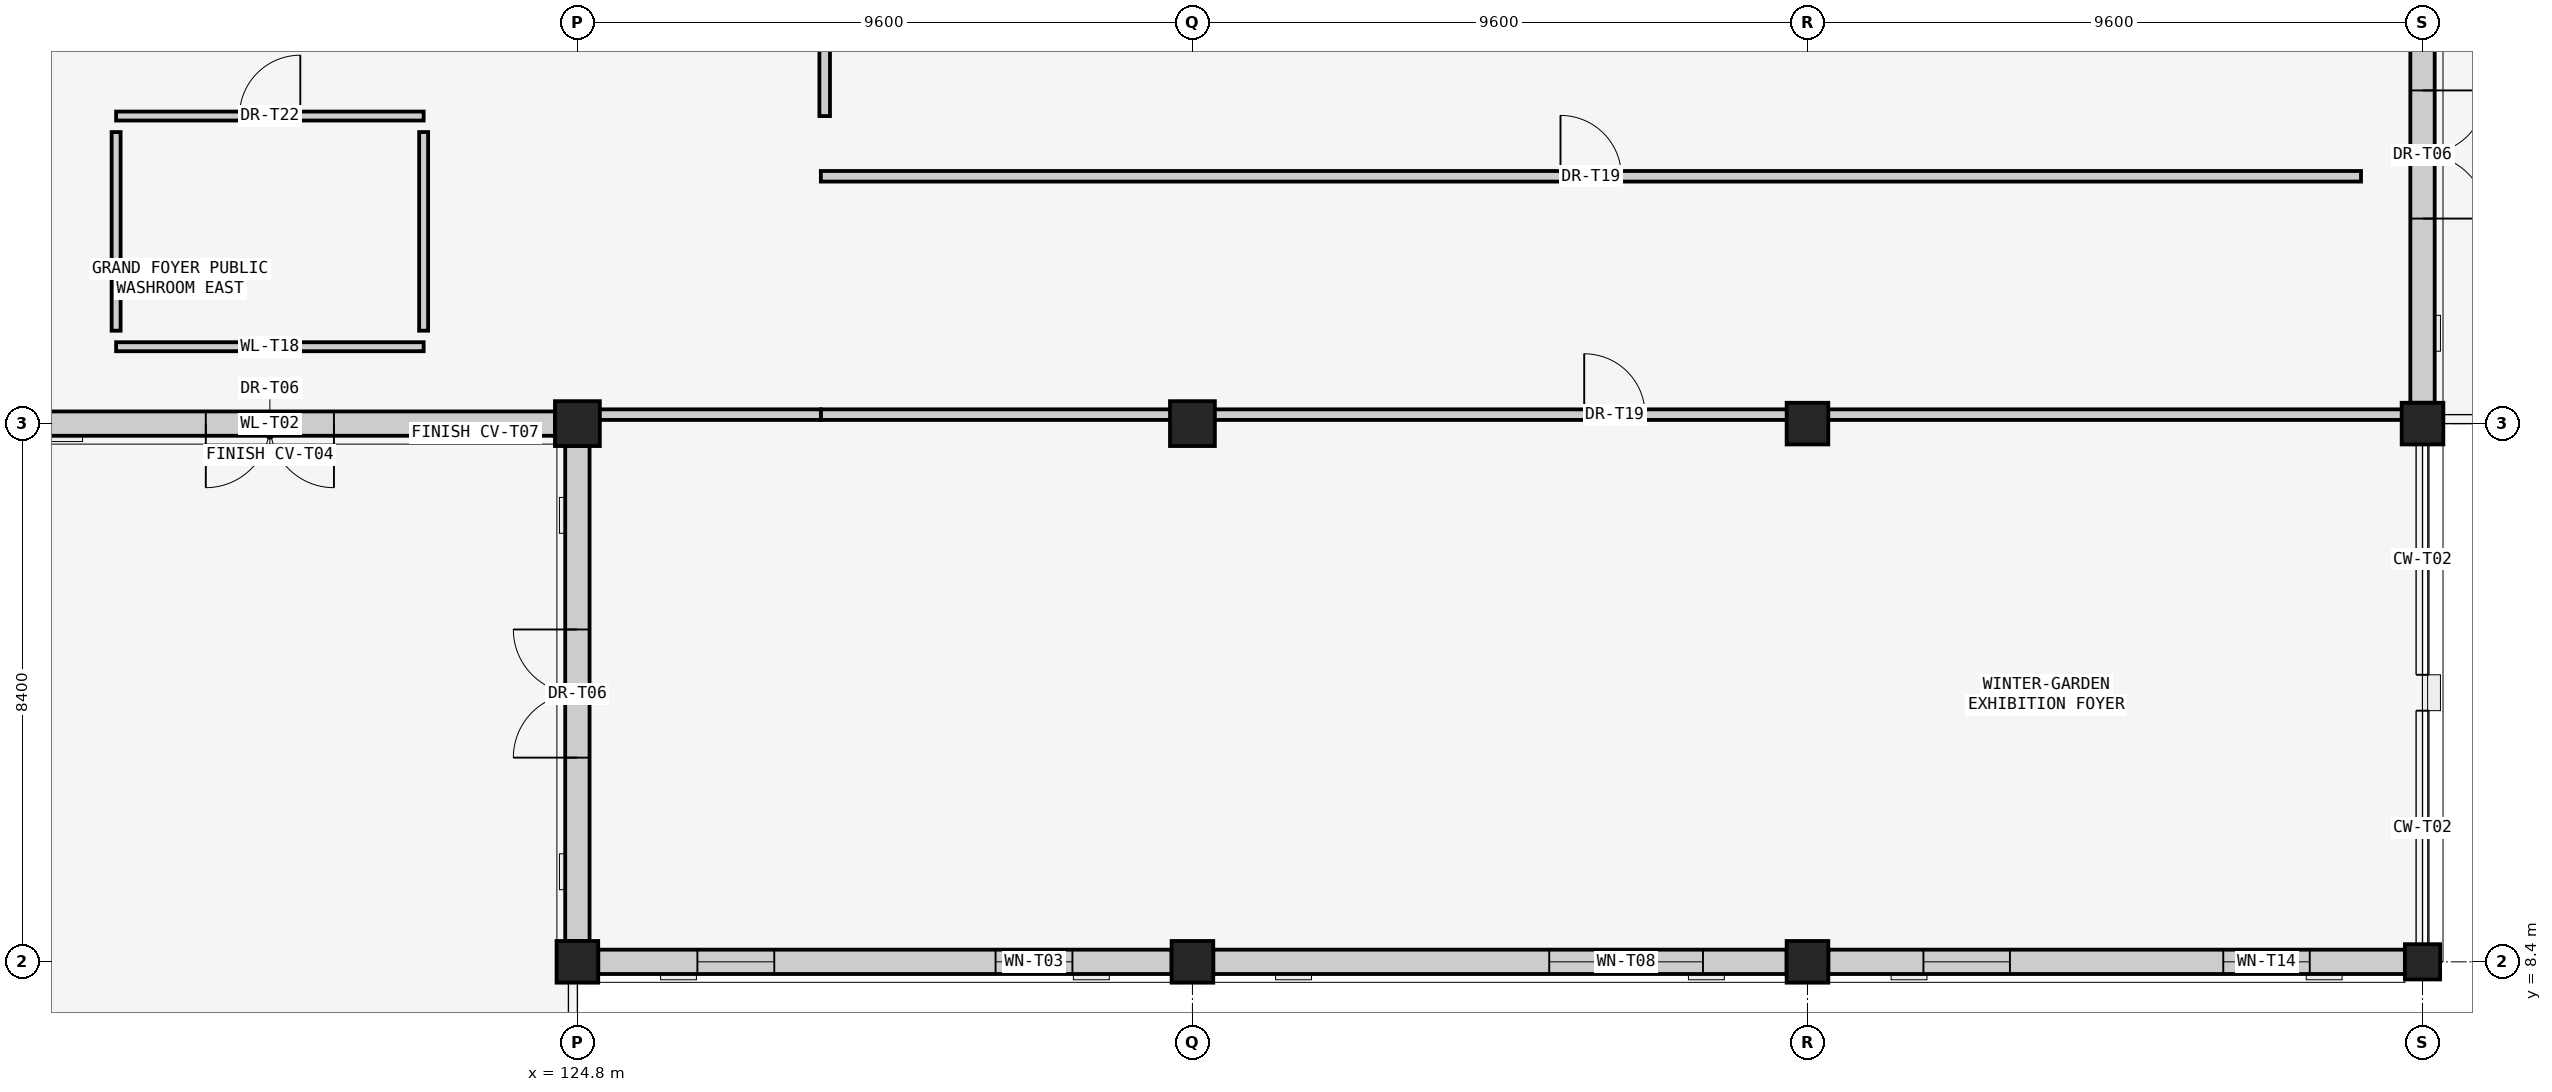
"""IFC4 building model, lengths in metres.
Left out: names, types, materials, properties, quantities, classifications, styles, units other than length and angle.
Written with IfcOpenShell. Run it as: python <this file> out.ifc"""

import sys

from ifc_helpers import new_model, si_unit, direction, frame, frame_2d, origin, origin_2d, place, context, subcontext, project, spatial, rectangle, extrude, element, fill, save


model = new_model("IFC4")
c1 = context("Model", 3, precision=1e-05, world=origin(), true_north=direction((0.0, 1.0)))
c2 = subcontext(c1, "Body", "Model", "MODEL_VIEW")
j1 = project(units=[si_unit("LENGTHUNIT", "METRE"), si_unit("PLANEANGLEUNIT", "RADIAN")], contexts=[c1])
p1 = place(None, origin())
s1 = spatial("IfcSite", under=j1, at=p1, CompositionType="ELEMENT")
p2 = place(p1, origin())
s2 = spatial("IfcBuilding", under=s1, at=p2, CompositionType="ELEMENT")
p3 = place(p2, origin())
s3 = spatial("IfcBuildingStorey", under=s2, at=p3, CompositionType="ELEMENT", Elevation=0.0)
p4 = place(p3, frame((124.8, 8.4, 0.0), z_axis=(0.0, 0.0, 1.0), x_axis=(1.0, 0.0, 0.0)))
e1 = element("IfcColumn", 1, at=p4, inside=s3, PredefinedType="COLUMN", context=c2, shape_type="SweptSolid", body=[
    extrude(rectangle(XDim=0.65, YDim=0.65, at=origin_2d()), origin(), (0.0, 0.0, 1.0), 5.12),
])
p5 = place(p3, frame((124.8, 16.8, 0.0), z_axis=(0.0, 0.0, 1.0), x_axis=(1.0, 0.0, 0.0)))
e2 = element("IfcColumn", 2, at=p5, inside=s3, PredefinedType="COLUMN", context=c2, shape_type="SweptSolid", body=[
    extrude(rectangle(XDim=0.7, YDim=0.7, at=origin_2d()), origin(), (0.0, 0.0, 1.0), 5.12),
])
p6 = place(p3, frame((134.4, 8.4, 0.0), z_axis=(0.0, 0.0, 1.0), x_axis=(1.0, 0.0, 0.0)))
e3 = element("IfcColumn", 3, at=p6, inside=s3, PredefinedType="COLUMN", context=c2, shape_type="SweptSolid", body=[
    extrude(rectangle(XDim=0.65, YDim=0.65, at=origin_2d()), origin(), (0.0, 0.0, 1.0), 5.12),
])
p7 = place(p3, frame((134.4, 16.8, 0.0), z_axis=(0.0, 0.0, 1.0), x_axis=(1.0, 0.0, 0.0)))
e4 = element("IfcColumn", 4, at=p7, inside=s3, PredefinedType="COLUMN", context=c2, shape_type="SweptSolid", body=[
    extrude(rectangle(XDim=0.7, YDim=0.7, at=origin_2d()), origin(), (0.0, 0.0, 1.0), 5.12),
])
p8 = place(p3, frame((144.0, 8.4, 0.0), z_axis=(0.0, 0.0, 1.0), x_axis=(1.0, 0.0, 0.0)))
e5 = element("IfcColumn", 5, at=p8, inside=s3, PredefinedType="COLUMN", context=c2, shape_type="SweptSolid", body=[
    extrude(rectangle(XDim=0.65, YDim=0.65, at=origin_2d()), origin(), (0.0, 0.0, 1.0), 5.12),
])
p9 = place(p3, frame((144.0, 16.8, 0.0), z_axis=(0.0, 0.0, 1.0), x_axis=(1.0, 0.0, 0.0)))
e6 = element("IfcColumn", 6, at=p9, inside=s3, PredefinedType="PILASTER", context=c2, shape_type="SweptSolid", body=[
    extrude(rectangle(XDim=0.65, YDim=0.65, at=origin_2d()), origin(), (0.0, 0.0, 1.0), 5.12),
])
p10 = place(p3, frame((153.6, 8.4, 0.0), z_axis=(0.0, 0.0, 1.0), x_axis=(1.0, 0.0, 0.0)))
e7 = element("IfcColumn", 7, at=p10, inside=s3, PredefinedType="COLUMN", context=c2, shape_type="SweptSolid", body=[
    extrude(rectangle(XDim=0.55, YDim=0.55, at=origin_2d()), origin(), (0.0, 0.0, 1.0), 5.17),
])
p11 = place(p3, frame((153.6, 16.8, 0.0), z_axis=(0.0, 0.0, 1.0), x_axis=(1.0, 0.0, 0.0)))
e8 = element("IfcColumn", 8, at=p11, inside=s3, PredefinedType="COLUMN", context=c2, shape_type="SweptSolid", body=[
    extrude(rectangle(XDim=0.65, YDim=0.65, at=origin_2d()), origin(), (0.0, 0.0, 1.0), 5.12),
])
p12 = place(p3, frame((124.45, 16.8, 0.0), z_axis=(0.0, 0.0, 1.0), x_axis=(-1.0, 0.0, 0.0)))
e9 = element("IfcWall", 9, at=p12, inside=s3, PredefinedType="SOLIDWALL", context=c2, shape_type="SweptSolid", body=[
    extrude(rectangle(XDim=8.9, YDim=0.38, at=frame_2d((4.45, 0.0))), origin(), (0.0, 0.0, 1.0), 4.5),
])
p13 = place(p12, frame((3.45, 0.0, 0.0)))
e10 = element("IfcOpeningElement", 10, at=p13, cuts=e9, PredefinedType="OPENING", context=c2, shape_type="SweptSolid", body=[
    extrude(rectangle(XDim=2.0, YDim=2.25, at=frame_2d((1.0, 1.125))), frame((0.0, 0.2, 0.0), z_axis=(0.0, -1.0, 0.0), x_axis=(1.0, 0.0, 0.0)), (0.0, 0.0, 1.0), 0.4),
])
p14 = place(p3, frame((134.075, 8.4, 0.0), z_axis=(0.0, 0.0, 1.0), x_axis=(-1.0, 0.0, 0.0)))
e11 = element("IfcWall", 11, at=p14, inside=s3, PredefinedType="SOLIDWALL", context=c2, shape_type="SweptSolid", body=[
    extrude(rectangle(XDim=8.95, YDim=0.38, at=frame_2d((4.475, 0.0))), origin(), (0.0, 0.0, 1.0), 4.5),
])
p15 = place(p14, frame((1.548, 0.0, 0.95)))
e12 = element("IfcOpeningElement", 12, at=p15, cuts=e11, PredefinedType="OPENING", context=c2, shape_type="SweptSolid", body=[
    extrude(rectangle(XDim=1.2, YDim=2.2, at=frame_2d((0.6, 1.1))), frame((0.0, 0.2, 0.0), z_axis=(0.0, -1.0, 0.0), x_axis=(1.0, 0.0, 0.0)), (0.0, 0.0, 1.0), 0.4),
])
p16 = place(p14, frame((6.202, 0.0, 0.95)))
e13 = element("IfcOpeningElement", 13, at=p16, cuts=e11, PredefinedType="OPENING", context=c2, shape_type="SweptSolid", body=[
    extrude(rectangle(XDim=1.2, YDim=2.2, at=frame_2d((0.6, 1.1))), frame((0.0, 0.2, 0.0), z_axis=(0.0, -1.0, 0.0), x_axis=(1.0, 0.0, 0.0)), (0.0, 0.0, 1.0), 0.4),
])
p17 = place(p3, frame((124.8, 8.725, 0.0), z_axis=(0.0, 0.0, 1.0), x_axis=(0.0, 1.0, 0.0)))
e14 = element("IfcWall", 14, at=p17, inside=s3, PredefinedType="SOLIDWALL", context=c2, shape_type="SweptSolid", body=[
    extrude(rectangle(XDim=7.725, YDim=0.38, at=frame_2d((3.862, 0.0))), origin(), (0.0, 0.0, 1.0), 4.5),
])
p18 = place(p17, frame((2.862, 0.0, 0.0)))
e15 = element("IfcOpeningElement", 15, at=p18, cuts=e14, PredefinedType="OPENING", context=c2, shape_type="SweptSolid", body=[
    extrude(rectangle(XDim=2.0, YDim=2.25, at=frame_2d((1.0, 1.125))), frame((0.0, 0.2, 0.0), z_axis=(0.0, -1.0, 0.0), x_axis=(1.0, 0.0, 0.0)), (0.0, 0.0, 1.0), 0.4),
])
p19 = place(p3, frame((143.675, 8.4, 0.0), z_axis=(0.0, 0.0, 1.0), x_axis=(-1.0, 0.0, 0.0)))
e16 = element("IfcWall", 16, at=p19, inside=s3, PredefinedType="SOLIDWALL", context=c2, shape_type="SweptSolid", body=[
    extrude(rectangle(XDim=8.95, YDim=0.38, at=frame_2d((4.475, 0.0))), origin(), (0.0, 0.0, 1.0), 4.5),
])
p20 = place(p19, frame((1.306, 0.0, 0.95)))
e17 = element("IfcOpeningElement", 17, at=p20, cuts=e16, PredefinedType="OPENING", context=c2, shape_type="SweptSolid", body=[
    extrude(rectangle(XDim=2.4, YDim=2.2, at=frame_2d((1.2, 1.1))), frame((0.0, 0.2, 0.0), z_axis=(0.0, -1.0, 0.0), x_axis=(1.0, 0.0, 0.0)), (0.0, 0.0, 1.0), 0.4),
])
p21 = place(p3, frame((153.325, 8.4, 0.0), z_axis=(0.0, 0.0, 1.0), x_axis=(-1.0, 0.0, 0.0)))
e18 = element("IfcWall", 18, at=p21, inside=s3, PredefinedType="SOLIDWALL", context=c2, shape_type="SweptSolid", body=[
    extrude(rectangle(XDim=9.0, YDim=0.38, at=frame_2d((4.5, 0.0))), origin(), (0.0, 0.0, 1.0), 4.5),
])
p22 = place(p21, frame((1.485, 0.0, 0.85)))
e19 = element("IfcOpeningElement", 19, at=p22, cuts=e18, PredefinedType="OPENING", context=c2, shape_type="SweptSolid", body=[
    extrude(rectangle(XDim=1.35, YDim=2.6, at=frame_2d((0.675, 1.3))), frame((0.0, 0.2, 0.0), z_axis=(0.0, -1.0, 0.0), x_axis=(1.0, 0.0, 0.0)), (0.0, 0.0, 1.0), 0.4),
])
p23 = place(p21, frame((6.165, 0.0, 0.85)))
e20 = element("IfcOpeningElement", 20, at=p23, cuts=e18, PredefinedType="OPENING", context=c2, shape_type="SweptSolid", body=[
    extrude(rectangle(XDim=1.35, YDim=2.6, at=frame_2d((0.675, 1.3))), frame((0.0, 0.2, 0.0), z_axis=(0.0, -1.0, 0.0), x_axis=(1.0, 0.0, 0.0)), (0.0, 0.0, 1.0), 0.4),
])
p24 = place(p3, frame((153.6, 24.875, 0.0), z_axis=(0.0, 0.0, 1.0), x_axis=(0.0, -1.0, 0.0)))
e21 = element("IfcWall", 21, at=p24, inside=s3, PredefinedType="SOLIDWALL", context=c2, shape_type="SweptSolid", body=[
    extrude(rectangle(XDim=7.75, YDim=0.38, at=frame_2d((3.875, 0.0))), origin(), (0.0, 0.0, 1.0), 4.4),
])
p25 = place(p24, frame((2.875, 0.0, 0.0)))
e22 = element("IfcOpeningElement", 22, at=p25, cuts=e21, PredefinedType="OPENING", context=c2, shape_type="SweptSolid", body=[
    extrude(rectangle(XDim=2.0, YDim=2.25, at=frame_2d((1.0, 1.125))), frame((0.0, 0.2, 0.0), z_axis=(0.0, -1.0, 0.0), x_axis=(1.0, 0.0, 0.0)), (0.0, 0.0, 1.0), 0.4),
])
p26 = place(p3, frame((117.6, 18.0, 0.0), z_axis=(0.0, 0.0, 1.0), x_axis=(1.0, 0.0, 0.0)))
e23 = element("IfcWall", 23, at=p26, inside=s3, PredefinedType="PARTITIONING", context=c2, shape_type="SweptSolid", body=[
    extrude(rectangle(XDim=4.8, YDim=0.14, at=frame_2d((2.4, 0.0))), origin(), (0.0, 0.0, 1.0), 4.92),
])
p27 = place(p3, frame((117.6, 21.6, 0.0), z_axis=(0.0, 0.0, 1.0), x_axis=(1.0, 0.0, 0.0)))
e24 = element("IfcWall", 24, at=p27, inside=s3, PredefinedType="PARTITIONING", context=c2, shape_type="SweptSolid", body=[
    extrude(rectangle(XDim=4.8, YDim=0.14, at=frame_2d((2.4, 0.0))), origin(), (0.0, 0.0, 1.0), 4.92),
])
p28 = place(p27, frame((1.925, 0.0, 0.0)))
e25 = element("IfcOpeningElement", 25, at=p28, cuts=e24, PredefinedType="OPENING", context=c2, shape_type="SweptSolid", body=[
    extrude(rectangle(XDim=0.95, YDim=2.15, at=frame_2d((0.475, 1.075))), frame((0.0, 0.08, 0.0), z_axis=(0.0, -1.0, 0.0), x_axis=(1.0, 0.0, 0.0)), (0.0, 0.0, 1.0), 0.16),
])
for number, where, z_axis, x_axis in (
    (26, (117.6, 18.25, 0.0), (0.0, 0.0, 1.0), (0.0, 1.0, 0.0)),
    (27, (122.4, 18.25, 0.0), (0.0, 0.0, 1.0), (0.0, 1.0, 0.0)),
):
    element("IfcWall", number, at=place(p3, frame(where, z_axis=z_axis, x_axis=x_axis)), inside=s3, PredefinedType="PARTITIONING", context=c2, shape_type="SweptSolid", body=[
        extrude(rectangle(XDim=3.1, YDim=0.14, at=frame_2d((1.55, 0.0))), origin(), (0.0, 0.0, 1.0), 4.92),
    ])
p29 = place(p3, frame((128.66, 21.6, 0.0), z_axis=(0.0, 0.0, 1.0), x_axis=(0.0, 1.0, 0.0)))
e28 = element("IfcWall", 28, at=p29, inside=s3, PredefinedType="PARTITIONING", context=c2, shape_type="SweptSolid", body=[
    extrude(rectangle(XDim=3.6, YDim=0.165, at=frame_2d((1.8, 0.0))), origin(), (0.0, 0.0, 1.0), 4.99),
])
p30 = place(p3, frame((128.6, 20.66, 0.0), z_axis=(0.0, 0.0, 1.0), x_axis=(1.0, 0.0, 0.0)))
e29 = element("IfcWall", 29, at=p30, inside=s3, PredefinedType="PARTITIONING", context=c2, shape_type="SweptSolid", body=[
    extrude(rectangle(XDim=24.04, YDim=0.165, at=frame_2d((12.02, 0.0))), origin(), (0.0, 0.0, 1.0), 4.99),
])
p31 = place(p30, frame((11.545, 0.0, 0.0)))
e30 = element("IfcOpeningElement", 30, at=p31, cuts=e29, PredefinedType="OPENING", context=c2, shape_type="SweptSolid", body=[
    extrude(rectangle(XDim=0.95, YDim=2.15, at=frame_2d((0.475, 1.075))), frame((0.0, 0.093, 0.0), z_axis=(0.0, -1.0, 0.0), x_axis=(1.0, 0.0, 0.0)), (0.0, 0.0, 1.0), 0.185),
])
p32 = place(p3, frame((128.6, 16.94, 0.0), z_axis=(0.0, 0.0, 1.0), x_axis=(1.0, 0.0, 0.0)))
e31 = element("IfcWall", 31, at=p32, inside=s3, PredefinedType="PARTITIONING", context=c2, shape_type="SweptSolid", body=[
    extrude(rectangle(XDim=24.78, YDim=0.165, at=frame_2d((12.39, 0.0))), origin(), (0.0, 0.0, 1.0), 4.15),
])
p33 = place(p32, frame((11.915, 0.0, 0.0)))
e32 = element("IfcOpeningElement", 32, at=p33, cuts=e31, PredefinedType="OPENING", context=c2, shape_type="SweptSolid", body=[
    extrude(rectangle(XDim=0.95, YDim=2.15, at=frame_2d((0.475, 1.075))), frame((0.0, 0.093, 0.0), z_axis=(0.0, -1.0, 0.0), x_axis=(1.0, 0.0, 0.0)), (0.0, 0.0, 1.0), 0.185),
])
p34 = place(p3, frame((125.0, 16.94, 0.0), z_axis=(0.0, 0.0, 1.0), x_axis=(1.0, 0.0, 0.0)))
e33 = element("IfcWall", 33, at=p34, inside=s3, PredefinedType="PARTITIONING", context=c2, shape_type="SweptSolid", body=[
    extrude(rectangle(XDim=3.6, YDim=0.165, at=frame_2d((1.8, 0.0))), origin(), (0.0, 0.0, 1.0), 4.25),
])
p35 = place(p13, origin())
e34 = element("IfcDoor", 34, at=p35, inside=s3, OperationType="DOUBLE_DOOR_SINGLE_SWING", PredefinedType="DOOR", context=c2, shape_type="SweptSolid", body=[
    extrude(rectangle(XDim=2.0, YDim=2.25, at=frame_2d((1.0, 1.125))), frame((0.0, 0.025, 0.0), z_axis=(0.0, -1.0, 0.0), x_axis=(1.0, 0.0, 0.0)), (0.0, 0.0, 1.0), 0.05),
])
fill(e10, e34)
p36 = place(p15, origin())
e35 = element("IfcWindow", 35, at=p36, inside=s3, PartitioningType="SINGLE_PANEL", PredefinedType="WINDOW", context=c2, shape_type="SweptSolid", body=[
    extrude(rectangle(XDim=1.2, YDim=2.2, at=frame_2d((0.6, 1.1))), frame((0.0, 0.03, 0.0), z_axis=(0.0, -1.0, 0.0), x_axis=(1.0, 0.0, 0.0)), (0.0, 0.0, 1.0), 0.06),
])
fill(e12, e35)
p37 = place(p16, origin())
e36 = element("IfcWindow", 36, at=p37, inside=s3, PartitioningType="SINGLE_PANEL", PredefinedType="WINDOW", context=c2, shape_type="SweptSolid", body=[
    extrude(rectangle(XDim=1.2, YDim=2.2, at=frame_2d((0.6, 1.1))), frame((0.0, 0.03, 0.0), z_axis=(0.0, -1.0, 0.0), x_axis=(1.0, 0.0, 0.0)), (0.0, 0.0, 1.0), 0.06),
])
fill(e13, e36)
p38 = place(p18, origin())
e37 = element("IfcDoor", 37, at=p38, inside=s3, OperationType="DOUBLE_DOOR_SINGLE_SWING", PredefinedType="DOOR", context=c2, shape_type="SweptSolid", body=[
    extrude(rectangle(XDim=2.0, YDim=2.25, at=frame_2d((1.0, 1.125))), frame((0.0, 0.025, 0.0), z_axis=(0.0, -1.0, 0.0), x_axis=(1.0, 0.0, 0.0)), (0.0, 0.0, 1.0), 0.05),
])
fill(e15, e37)
p39 = place(p20, origin())
e38 = element("IfcWindow", 38, at=p39, inside=s3, PartitioningType="SINGLE_PANEL", PredefinedType="WINDOW", context=c2, shape_type="SweptSolid", body=[
    extrude(rectangle(XDim=2.4, YDim=2.2, at=frame_2d((1.2, 1.1))), frame((0.0, 0.03, 0.0), z_axis=(0.0, -1.0, 0.0), x_axis=(1.0, 0.0, 0.0)), (0.0, 0.0, 1.0), 0.06),
])
fill(e17, e38)
p40 = place(p22, origin())
e39 = element("IfcWindow", 39, at=p40, inside=s3, PartitioningType="SINGLE_PANEL", PredefinedType="WINDOW", context=c2, shape_type="SweptSolid", body=[
    extrude(rectangle(XDim=1.35, YDim=2.6, at=frame_2d((0.675, 1.3))), frame((0.0, 0.03, 0.0), z_axis=(0.0, -1.0, 0.0), x_axis=(1.0, 0.0, 0.0)), (0.0, 0.0, 1.0), 0.06),
])
fill(e19, e39)
p41 = place(p23, origin())
e40 = element("IfcWindow", 40, at=p41, inside=s3, PartitioningType="SINGLE_PANEL", PredefinedType="WINDOW", context=c2, shape_type="SweptSolid", body=[
    extrude(rectangle(XDim=1.35, YDim=2.6, at=frame_2d((0.675, 1.3))), frame((0.0, 0.03, 0.0), z_axis=(0.0, -1.0, 0.0), x_axis=(1.0, 0.0, 0.0)), (0.0, 0.0, 1.0), 0.06),
])
fill(e20, e40)
p42 = place(p25, origin())
e41 = element("IfcDoor", 41, at=p42, inside=s3, OperationType="DOUBLE_DOOR_SINGLE_SWING", PredefinedType="DOOR", context=c2, shape_type="SweptSolid", body=[
    extrude(rectangle(XDim=2.0, YDim=2.25, at=frame_2d((1.0, 1.125))), frame((0.0, 0.025, 0.0), z_axis=(0.0, -1.0, 0.0), x_axis=(1.0, 0.0, 0.0)), (0.0, 0.0, 1.0), 0.05),
])
fill(e22, e41)
p43 = place(p28, origin())
e42 = element("IfcDoor", 42, at=p43, inside=s3, OperationType="SINGLE_SWING_RIGHT", PredefinedType="DOOR", context=c2, shape_type="SweptSolid", body=[
    extrude(rectangle(XDim=0.95, YDim=2.15, at=frame_2d((0.475, 1.075))), frame((0.0, 0.025, 0.0), z_axis=(0.0, -1.0, 0.0), x_axis=(1.0, 0.0, 0.0)), (0.0, 0.0, 1.0), 0.05),
])
fill(e25, e42)
p44 = place(p31, origin())
e43 = element("IfcDoor", 43, at=p44, inside=s3, OperationType="SINGLE_SWING_LEFT", PredefinedType="DOOR", context=c2, shape_type="SweptSolid", body=[
    extrude(rectangle(XDim=0.95, YDim=2.15, at=frame_2d((0.475, 1.075))), frame((0.0, 0.025, 0.0), z_axis=(0.0, -1.0, 0.0), x_axis=(1.0, 0.0, 0.0)), (0.0, 0.0, 1.0), 0.05),
])
fill(e30, e43)
p45 = place(p33, origin())
e44 = element("IfcDoor", 44, at=p45, inside=s3, OperationType="SINGLE_SWING_LEFT", PredefinedType="DOOR", context=c2, shape_type="SweptSolid", body=[
    extrude(rectangle(XDim=0.95, YDim=2.15, at=frame_2d((0.475, 1.075))), frame((0.0, 0.025, 0.0), z_axis=(0.0, -1.0, 0.0), x_axis=(1.0, 0.0, 0.0)), (0.0, 0.0, 1.0), 0.05),
])
fill(e32, e44)
save(model, sys.argv[1])
